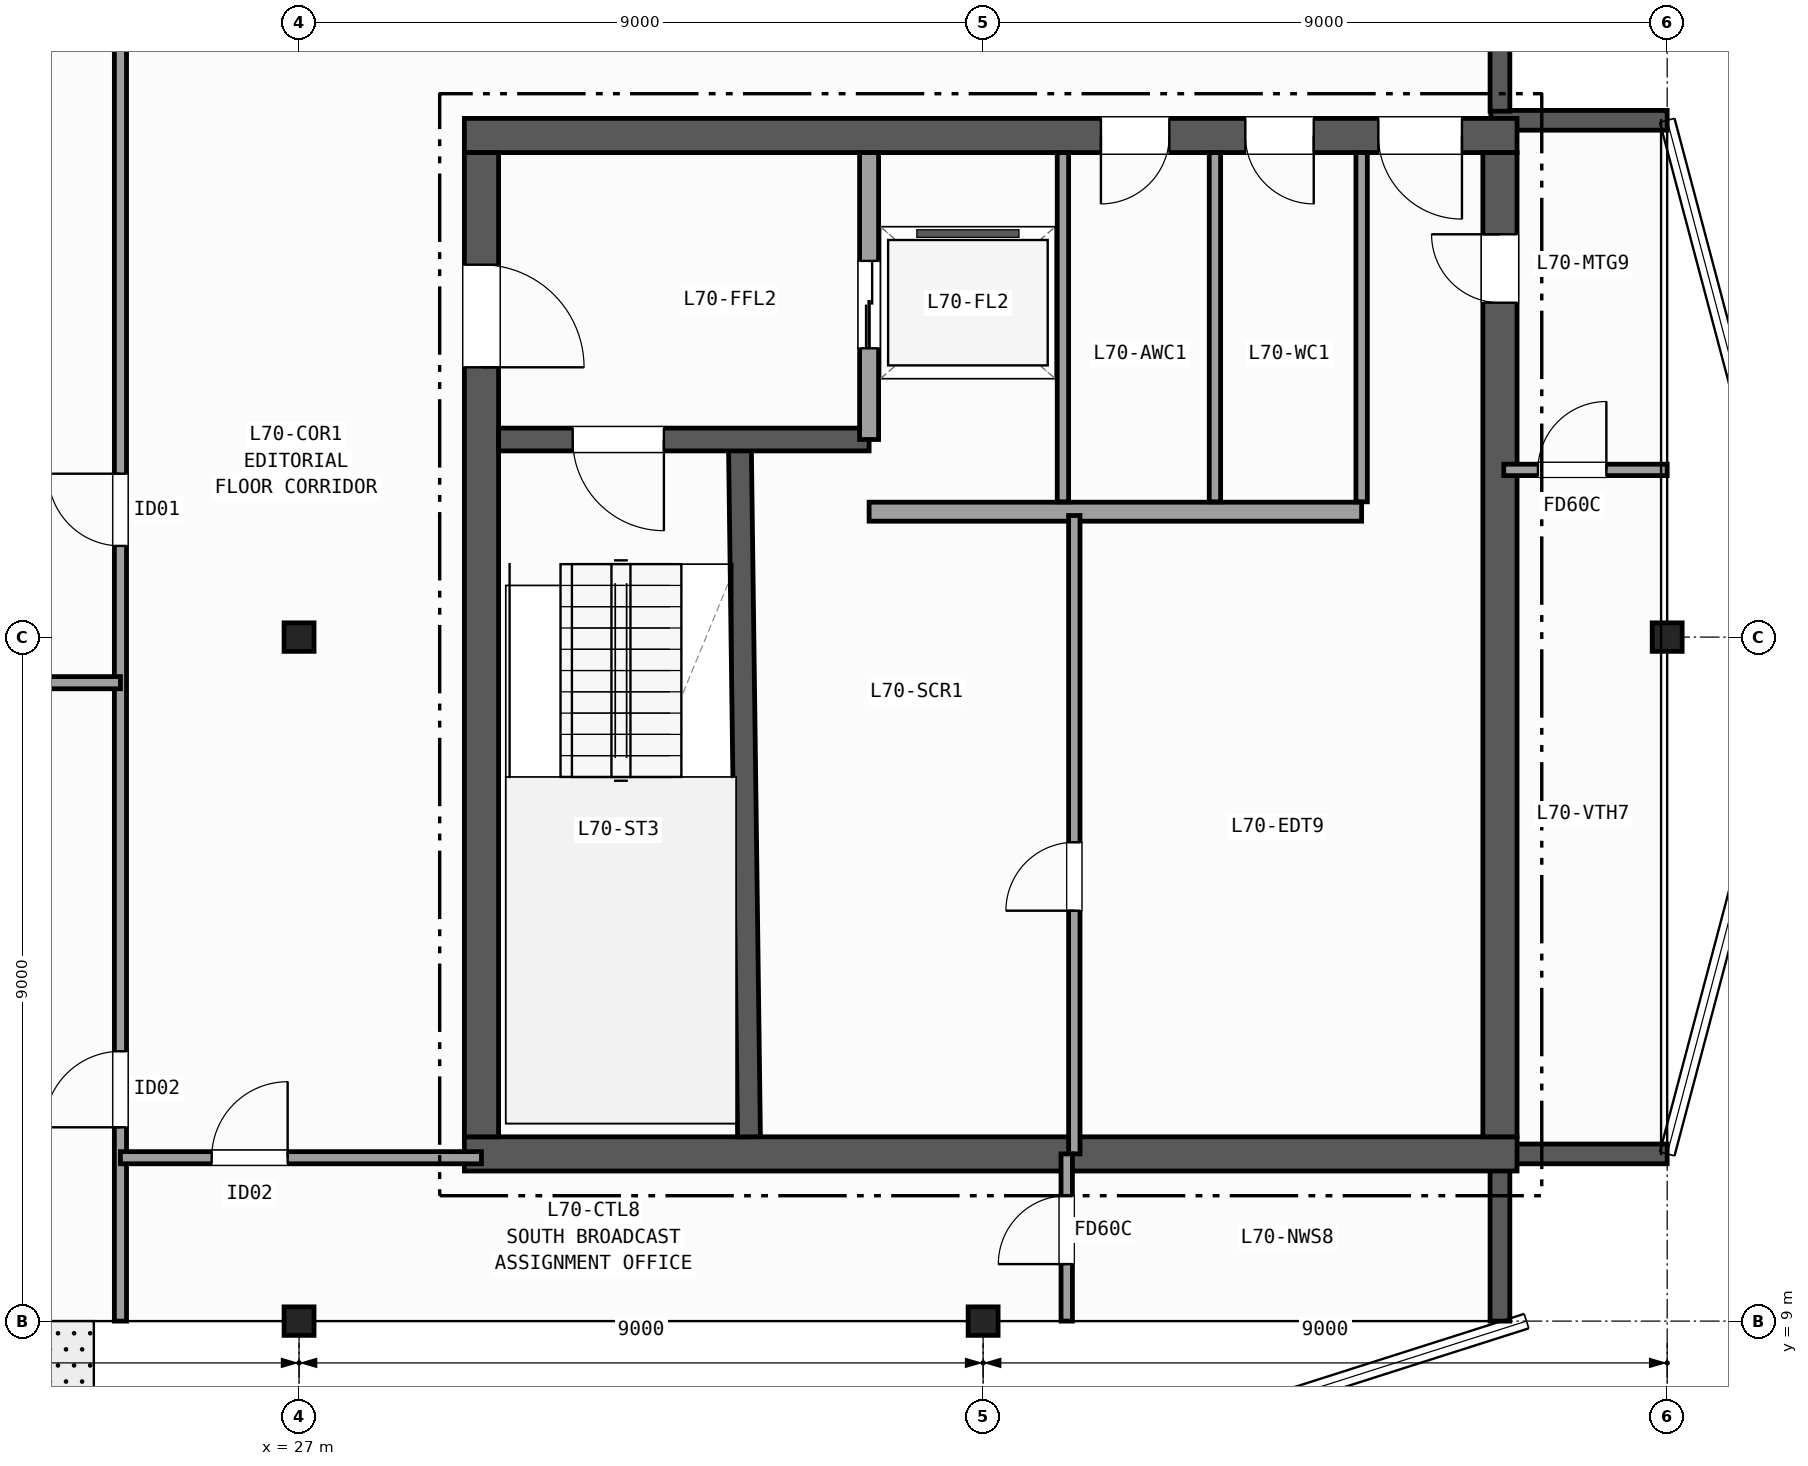
"""IFC4 building model, lengths in metres.
Left out: names, types, materials, properties, quantities, classifications, styles, units other than length and angle.
Written with IfcOpenShell. Run it as: python <this file> out.ifc"""

import sys

from ifc_helpers import new_model, si_unit, direction, frame, frame_2d, origin, origin_2d, place, context, subcontext, project, spatial, rectangle, i_section, extrude, element, fill, save


model = new_model("IFC4")
c1 = context("Model", 3, precision=1e-05, world=origin(), true_north=direction((0.0, 1.0)))
c2 = subcontext(c1, "Body", "Model", "MODEL_VIEW")
j1 = project(units=[si_unit("LENGTHUNIT", "METRE"), si_unit("PLANEANGLEUNIT", "RADIAN")], contexts=[c1])
p1 = place(None, origin())
s1 = spatial("IfcSite", under=j1, at=p1, CompositionType="ELEMENT")
p2 = place(p1, origin())
s2 = spatial("IfcBuilding", under=s1, at=p2, CompositionType="ELEMENT")
p3 = place(p2, frame((0.0, 0.0, 277.8)))
s3 = spatial("IfcBuildingStorey", under=s2, at=p3, CompositionType="ELEMENT", Elevation=277.8)
for number, where, z_axis, x_axis in (
    (1, (27.0, 9.0, 0.0), (0.0, 0.0, 1.0), (1.0, 0.0, 0.0)),
    (2, (27.0, 18.0, 0.0), (0.0, 0.0, 1.0), (1.0, 0.0, 0.0)),
    (3, (36.0, 9.0, 0.0), (0.0, 0.0, 1.0), (1.0, 0.0, 0.0)),
    (4, (45.0, 18.0, 0.0), (0.0, 0.0, 1.0), (1.0, 0.0, 0.0)),
):
    element("IfcColumn", number, at=place(p3, frame(where, z_axis=z_axis, x_axis=x_axis)), inside=s3, PredefinedType="COLUMN", context=c2, shape_type="SweptSolid", body=[
        extrude(i_section(OverallWidth=0.394, OverallDepth=0.375, WebThickness=0.017, FlangeThickness=0.028, FilletRadius=0.015, at=origin_2d()), origin(), (0.0, 0.0, 1.0), 3.7),
    ])
p4 = place(p3, frame((42.8, 9.0, 0.0), z_axis=(0.0, 0.0, 1.0), x_axis=(0.0, 1.0, 0.0)))
e5 = element("IfcWall", 5, at=p4, inside=s3, PredefinedType="SOLIDWALL", context=c2, shape_type="SweptSolid", body=[
    extrude(rectangle(XDim=2.08, YDim=0.26, at=frame_2d((1.04, 0.0))), origin(), (0.0, 0.0, 1.0), 3.42),
])
for number, where, z_axis, x_axis in (
    (6, (42.68, 11.2, 0.0), (0.0, 0.0, 1.0), (1.0, 0.0, 0.0)),
    (7, (45.0, 24.8, 0.0), (0.0, 0.0, 1.0), (-1.0, 0.0, 0.0)),
):
    element("IfcWall", number, at=place(p3, frame(where, z_axis=z_axis, x_axis=x_axis)), inside=s3, PredefinedType="SOLIDWALL", context=c2, shape_type="SweptSolid", body=[
        extrude(rectangle(XDim=2.32, YDim=0.26, at=frame_2d((1.16, 0.0))), origin(), (0.0, 0.0, 1.0), 3.42),
    ])
p5 = place(p3, frame((42.8, 24.92, 0.0), z_axis=(0.0, 0.0, 1.0), x_axis=(0.0, 1.0, 0.0)))
e8 = element("IfcWall", 8, at=p5, inside=s3, PredefinedType="SOLIDWALL", context=c2, shape_type="SweptSolid", body=[
    extrude(rectangle(XDim=2.08, YDim=0.26, at=frame_2d((1.04, 0.0))), origin(), (0.0, 0.0, 1.0), 3.42),
])
p6 = place(p3, frame((29.175, 11.2, 0.0), z_axis=(0.0, 0.0, 1.0), x_axis=(1.0, 0.0, 0.0)))
e9 = element("IfcWall", 9, at=p6, inside=s3, PredefinedType="SHEAR", context=c2, shape_type="SweptSolid", body=[
    extrude(rectangle(XDim=13.85, YDim=0.45, at=frame_2d((6.925, 0.0))), origin(), (0.0, 0.0, 1.0), 3.42),
])
p7 = place(p3, frame((43.025, 24.6, 0.0), z_axis=(0.0, 0.0, 1.0), x_axis=(-1.0, 0.0, 0.0)))
e10 = element("IfcWall", 10, at=p7, inside=s3, PredefinedType="SHEAR", context=c2, shape_type="SweptSolid", body=[
    extrude(rectangle(XDim=13.85, YDim=0.45, at=frame_2d((6.925, 0.0))), origin(), (0.0, 0.0, 1.0), 3.42),
])
p8 = place(p7, frame((0.725, 0.0, 0.0)))
e11 = element("IfcOpeningElement", 11, at=p8, cuts=e10, PredefinedType="OPENING", context=c2, shape_type="SweptSolid", body=[
    extrude(rectangle(XDim=1.1, YDim=2.15, at=frame_2d((0.55, 1.075))), frame((0.0, 0.235, 0.0), z_axis=(0.0, -1.0, 0.0), x_axis=(1.0, 0.0, 0.0)), (0.0, 0.0, 1.0), 0.47),
])
p9 = place(p7, frame((2.675, 0.0, 0.0)))
e12 = element("IfcOpeningElement", 12, at=p9, cuts=e10, PredefinedType="OPENING", context=c2, shape_type="SweptSolid", body=[
    extrude(rectangle(XDim=0.9, YDim=2.1, at=frame_2d((0.45, 1.05))), frame((0.0, 0.235, 0.0), z_axis=(0.0, -1.0, 0.0), x_axis=(1.0, 0.0, 0.0)), (0.0, 0.0, 1.0), 0.47),
])
p10 = place(p7, frame((4.575, 0.0, 0.0)))
e13 = element("IfcOpeningElement", 13, at=p10, cuts=e10, PredefinedType="OPENING", context=c2, shape_type="SweptSolid", body=[
    extrude(rectangle(XDim=0.9, YDim=2.1, at=frame_2d((0.45, 1.05))), frame((0.0, 0.235, 0.0), z_axis=(0.0, -1.0, 0.0), x_axis=(1.0, 0.0, 0.0)), (0.0, 0.0, 1.0), 0.47),
])
p11 = place(p3, frame((29.4, 24.375, 0.0), z_axis=(0.0, 0.0, 1.0), x_axis=(0.0, -1.0, 0.0)))
e14 = element("IfcWall", 14, at=p11, inside=s3, PredefinedType="SHEAR", context=c2, shape_type="SweptSolid", body=[
    extrude(rectangle(XDim=12.95, YDim=0.45, at=frame_2d((6.475, 0.0))), origin(), (0.0, 0.0, 1.0), 3.42),
])
p12 = place(p11, frame((1.475, 0.0, 0.0)))
e15 = element("IfcOpeningElement", 15, at=p12, cuts=e14, PredefinedType="OPENING", context=c2, shape_type="SweptSolid", body=[
    extrude(rectangle(XDim=1.35, YDim=2.15, at=frame_2d((0.675, 1.075))), frame((0.0, 0.235, 0.0), z_axis=(0.0, -1.0, 0.0), x_axis=(1.0, 0.0, 0.0)), (0.0, 0.0, 1.0), 0.47),
])
p13 = place(p3, frame((42.8, 11.425, 0.0), z_axis=(0.0, 0.0, 1.0), x_axis=(0.0, 1.0, 0.0)))
e16 = element("IfcWall", 16, at=p13, inside=s3, PredefinedType="SHEAR", context=c2, shape_type="SweptSolid", body=[
    extrude(rectangle(XDim=12.95, YDim=0.45, at=frame_2d((6.475, 0.0))), origin(), (0.0, 0.0, 1.0), 3.42),
])
p14 = place(p13, frame((10.975, 0.0, 0.0)))
e17 = element("IfcOpeningElement", 17, at=p14, cuts=e16, PredefinedType="OPENING", context=c2, shape_type="SweptSolid", body=[
    extrude(rectangle(XDim=0.9, YDim=2.1, at=frame_2d((0.45, 1.05))), frame((0.0, 0.235, 0.0), z_axis=(0.0, -1.0, 0.0), x_axis=(1.0, 0.0, 0.0)), (0.0, 0.0, 1.0), 0.47),
])
p15 = place(p3, frame((32.92, 11.425, 0.0), z_axis=(0.0, 0.0, 1.0), x_axis=(-0.013135638869, 0.999913723774, 0.0)))
e18 = element("IfcWall", 18, at=p15, inside=s3, PredefinedType="SHEAR", context=c2, shape_type="SweptSolid", body=[
    extrude(rectangle(XDim=9.126, YDim=0.3, at=frame_2d((4.563, 0.0))), origin(), (0.0, 0.0, 1.0), 3.42),
])
p16 = place(p3, frame((34.5, 20.6, 0.0), z_axis=(0.0, 0.0, 1.0), x_axis=(-1.0, 0.0, 0.0)))
e19 = element("IfcWall", 19, at=p16, inside=s3, PredefinedType="SHEAR", context=c2, shape_type="SweptSolid", body=[
    extrude(rectangle(XDim=4.875, YDim=0.3, at=frame_2d((2.438, 0.0))), origin(), (0.0, 0.0, 1.0), 3.42),
])
p17 = place(p16, frame((2.7, 0.0, 0.0)))
e20 = element("IfcOpeningElement", 20, at=p17, cuts=e19, PredefinedType="OPENING", context=c2, shape_type="SweptSolid", body=[
    extrude(rectangle(XDim=1.2, YDim=2.15, at=frame_2d((0.6, 1.075))), frame((0.0, 0.16, 0.0), z_axis=(0.0, -1.0, 0.0), x_axis=(1.0, 0.0, 0.0)), (0.0, 0.0, 1.0), 0.32),
])
p18 = place(p3, frame((34.5, 20.6, 0.0), z_axis=(0.0, 0.0, 1.0), x_axis=(0.0, 1.0, 0.0)))
e21 = element("IfcWall", 21, at=p18, inside=s3, PredefinedType="PARTITIONING", context=c2, shape_type="SweptSolid", body=[
    extrude(rectangle(XDim=3.775, YDim=0.25, at=frame_2d((1.887, 0.0))), origin(), (0.0, 0.0, 1.0), 3.42),
])
p19 = place(p18, frame((1.2, 0.0, 0.0)))
e22 = element("IfcOpeningElement", 22, at=p19, cuts=e21, PredefinedType="OPENING", context=c2, shape_type="SweptSolid", body=[
    extrude(rectangle(XDim=1.15, YDim=2.15, at=frame_2d((0.575, 1.075))), frame((0.0, 0.135, 0.0), z_axis=(0.0, -1.0, 0.0), x_axis=(1.0, 0.0, 0.0)), (0.0, 0.0, 1.0), 0.27),
])
p20 = place(p3, frame((34.5, 19.65, 0.0), z_axis=(0.0, 0.0, 1.0), x_axis=(1.0, 0.0, 0.0)))
e23 = element("IfcWall", 23, at=p20, inside=s3, PredefinedType="PARTITIONING", context=c2, shape_type="SweptSolid", body=[
    extrude(rectangle(XDim=6.48, YDim=0.25, at=frame_2d((3.24, 0.0))), origin(), (0.0, 0.0, 1.0), 3.42),
])
p21 = place(p3, frame((37.2, 11.2, 0.0), z_axis=(0.0, 0.0, 1.0), x_axis=(0.0, 1.0, 0.0)))
e24 = element("IfcWall", 24, at=p21, inside=s3, PredefinedType="PARTITIONING", context=c2, shape_type="SweptSolid", body=[
    extrude(rectangle(XDim=8.4, YDim=0.15, at=frame_2d((4.2, 0.0))), origin(), (0.0, 0.0, 1.0), 3.42),
])
p22 = place(p21, frame((3.2, 0.0, 0.0)))
e25 = element("IfcOpeningElement", 25, at=p22, cuts=e24, PredefinedType="OPENING", context=c2, shape_type="SweptSolid", body=[
    extrude(rectangle(XDim=0.9, YDim=2.1, at=frame_2d((0.45, 1.05))), frame((0.0, 0.085, 0.0), z_axis=(0.0, -1.0, 0.0), x_axis=(1.0, 0.0, 0.0)), (0.0, 0.0, 1.0), 0.17),
])
for number, where, z_axis, x_axis in (
    (26, (37.05, 19.78, 0.0), (0.0, 0.0, 1.0), (0.0, 1.0, 0.0)),
    (27, (39.05, 19.78, 0.0), (0.0, 0.0, 1.0), (0.0, 1.0, 0.0)),
    (28, (40.98, 19.78, 0.0), (0.0, 0.0, 1.0), (0.0, 1.0, 0.0)),
):
    element("IfcWall", number, at=place(p3, frame(where, z_axis=z_axis, x_axis=x_axis)), inside=s3, PredefinedType="PARTITIONING", context=c2, shape_type="SweptSolid", body=[
        extrude(rectangle(XDim=4.595, YDim=0.15, at=frame_2d((2.297, 0.0))), origin(), (0.0, 0.0, 1.0), 3.42),
    ])
p23 = place(p3, frame((24.65, 9.0, 0.0), z_axis=(0.0, 0.0, 1.0), x_axis=(0.0, 1.0, 0.0)))
e29 = element("IfcWall", 29, at=p23, inside=s3, PredefinedType="PARTITIONING", context=c2, shape_type="SweptSolid", body=[
    extrude(rectangle(XDim=19.2, YDim=0.16, at=frame_2d((9.6, 0.0))), origin(), (0.0, 0.0, 1.0), 2.707),
])
p24 = place(p23, frame((10.2, 0.0, 0.0)))
e30 = element("IfcOpeningElement", 30, at=p24, cuts=e29, PredefinedType="OPENING", context=c2, shape_type="SweptSolid", body=[
    extrude(rectangle(XDim=0.95, YDim=2.1, at=frame_2d((0.475, 1.05))), frame((0.0, 0.09, 0.0), z_axis=(0.0, -1.0, 0.0), x_axis=(1.0, 0.0, 0.0)), (0.0, 0.0, 1.0), 0.18),
])
p25 = place(p23, frame((2.55, 0.0, 0.0)))
e31 = element("IfcOpeningElement", 31, at=p25, cuts=e29, PredefinedType="OPENING", context=c2, shape_type="SweptSolid", body=[
    extrude(rectangle(XDim=1.0, YDim=2.1, at=frame_2d((0.5, 1.05))), frame((0.0, 0.09, 0.0), z_axis=(0.0, -1.0, 0.0), x_axis=(1.0, 0.0, 0.0)), (0.0, 0.0, 1.0), 0.18),
])
p26 = place(p3, frame((18.0, 17.4, 0.0), z_axis=(0.0, 0.0, 1.0), x_axis=(1.0, 0.0, 0.0)))
e32 = element("IfcWall", 32, at=p26, inside=s3, PredefinedType="PARTITIONING", context=c2, shape_type="SweptSolid", body=[
    extrude(rectangle(XDim=6.65, YDim=0.16, at=frame_2d((3.325, 0.0))), origin(), (0.0, 0.0, 1.0), 2.792),
])
p27 = place(p3, frame((24.65, 11.15, 0.0), z_axis=(0.0, 0.0, 1.0), x_axis=(1.0, 0.0, 0.0)))
e33 = element("IfcWall", 33, at=p27, inside=s3, PredefinedType="PARTITIONING", context=c2, shape_type="SweptSolid", body=[
    extrude(rectangle(XDim=4.75, YDim=0.16, at=frame_2d((2.375, 0.0))), origin(), (0.0, 0.0, 1.0), 2.792),
])
p28 = place(p27, frame((1.2, 0.0, 0.0)))
e34 = element("IfcOpeningElement", 34, at=p28, cuts=e33, PredefinedType="OPENING", context=c2, shape_type="SweptSolid", body=[
    extrude(rectangle(XDim=1.0, YDim=2.1, at=frame_2d((0.5, 1.05))), frame((0.0, 0.09, 0.0), z_axis=(0.0, -1.0, 0.0), x_axis=(1.0, 0.0, 0.0)), (0.0, 0.0, 1.0), 0.18),
])
p29 = place(p3, frame((37.1, 9.0, 0.0), z_axis=(0.0, 0.0, 1.0), x_axis=(0.0, 1.0, 0.0)))
e35 = element("IfcWall", 35, at=p29, inside=s3, PredefinedType="PARTITIONING", context=c2, shape_type="SweptSolid", body=[
    extrude(rectangle(XDim=2.2, YDim=0.15, at=frame_2d((1.1, 0.0))), origin(), (0.0, 0.0, 1.0), 3.42),
])
p30 = place(p29, frame((0.75, 0.0, 0.0)))
e36 = element("IfcOpeningElement", 36, at=p30, cuts=e35, PredefinedType="OPENING", context=c2, shape_type="SweptSolid", body=[
    extrude(rectangle(XDim=0.9, YDim=2.1, at=frame_2d((0.45, 1.05))), frame((0.0, 0.085, 0.0), z_axis=(0.0, -1.0, 0.0), x_axis=(1.0, 0.0, 0.0)), (0.0, 0.0, 1.0), 0.17),
])
p31 = place(p3, frame((42.85, 20.2, 0.0), z_axis=(0.0, 0.0, 1.0), x_axis=(1.0, 0.0, 0.0)))
e37 = element("IfcWall", 37, at=p31, inside=s3, PredefinedType="PARTITIONING", context=c2, shape_type="SweptSolid", body=[
    extrude(rectangle(XDim=2.15, YDim=0.15, at=frame_2d((1.075, 0.0))), origin(), (0.0, 0.0, 1.0), 3.42),
])
p32 = place(p31, frame((0.45, 0.0, 0.0)))
e38 = element("IfcOpeningElement", 38, at=p32, cuts=e37, PredefinedType="OPENING", context=c2, shape_type="SweptSolid", body=[
    extrude(rectangle(XDim=0.9, YDim=2.1, at=frame_2d((0.45, 1.05))), frame((0.0, 0.085, 0.0), z_axis=(0.0, -1.0, 0.0), x_axis=(1.0, 0.0, 0.0)), (0.0, 0.0, 1.0), 0.17),
])
p33 = place(p17, origin())
e39 = element("IfcDoor", 39, at=p33, inside=s3, OperationType="SINGLE_SWING_LEFT", PredefinedType="DOOR", context=c2, shape_type="SweptSolid", body=[
    extrude(rectangle(XDim=1.2, YDim=2.15, at=frame_2d((0.6, 1.075))), frame((0.0, 0.025, 0.0), z_axis=(0.0, -1.0, 0.0), x_axis=(1.0, 0.0, 0.0)), (0.0, 0.0, 1.0), 0.05),
])
fill(e20, e39)
p34 = place(p12, origin())
e40 = element("IfcDoor", 40, at=p34, inside=s3, OperationType="SINGLE_SWING_RIGHT", PredefinedType="DOOR", context=c2, shape_type="SweptSolid", body=[
    extrude(rectangle(XDim=1.35, YDim=2.15, at=frame_2d((0.675, 1.075))), frame((0.0, 0.025, 0.0), z_axis=(0.0, -1.0, 0.0), x_axis=(1.0, 0.0, 0.0)), (0.0, 0.0, 1.0), 0.05),
])
fill(e15, e40)
p35 = place(p14, origin())
e41 = element("IfcDoor", 41, at=p35, inside=s3, OperationType="SINGLE_SWING_RIGHT", PredefinedType="DOOR", context=c2, shape_type="SweptSolid", body=[
    extrude(rectangle(XDim=0.9, YDim=2.1, at=frame_2d((0.45, 1.05))), frame((0.0, 0.025, 0.0), z_axis=(0.0, -1.0, 0.0), x_axis=(1.0, 0.0, 0.0)), (0.0, 0.0, 1.0), 0.05),
])
fill(e17, e41)
p36 = place(p8, origin())
e42 = element("IfcDoor", 42, at=p36, inside=s3, OperationType="SINGLE_SWING_LEFT", PredefinedType="DOOR", context=c2, shape_type="SweptSolid", body=[
    extrude(rectangle(XDim=1.1, YDim=2.15, at=frame_2d((0.55, 1.075))), frame((0.0, 0.025, 0.0), z_axis=(0.0, -1.0, 0.0), x_axis=(1.0, 0.0, 0.0)), (0.0, 0.0, 1.0), 0.05),
])
fill(e11, e42)
p37 = place(p9, origin())
e43 = element("IfcDoor", 43, at=p37, inside=s3, OperationType="SINGLE_SWING_LEFT", PredefinedType="DOOR", context=c2, shape_type="SweptSolid", body=[
    extrude(rectangle(XDim=0.9, YDim=2.1, at=frame_2d((0.45, 1.05))), frame((0.0, 0.025, 0.0), z_axis=(0.0, -1.0, 0.0), x_axis=(1.0, 0.0, 0.0)), (0.0, 0.0, 1.0), 0.05),
])
fill(e12, e43)
p38 = place(p10, origin())
e44 = element("IfcDoor", 44, at=p38, inside=s3, OperationType="SINGLE_SWING_RIGHT", PredefinedType="DOOR", context=c2, shape_type="SweptSolid", body=[
    extrude(rectangle(XDim=0.9, YDim=2.1, at=frame_2d((0.45, 1.05))), frame((0.0, 0.025, 0.0), z_axis=(0.0, -1.0, 0.0), x_axis=(1.0, 0.0, 0.0)), (0.0, 0.0, 1.0), 0.05),
])
fill(e13, e44)
p39 = place(p19, origin())
e45 = element("IfcDoor", 45, at=p39, inside=s3, OperationType="DOUBLE_DOOR_SLIDING", PredefinedType="DOOR", context=c2, shape_type="SweptSolid", body=[
    extrude(rectangle(XDim=1.15, YDim=2.15, at=frame_2d((0.575, 1.075))), frame((0.0, 0.025, 0.0), z_axis=(0.0, -1.0, 0.0), x_axis=(1.0, 0.0, 0.0)), (0.0, 0.0, 1.0), 0.05),
])
fill(e22, e45)
p40 = place(p22, origin())
e46 = element("IfcDoor", 46, at=p40, inside=s3, OperationType="SINGLE_SWING_LEFT", PredefinedType="DOOR", context=c2, shape_type="SweptSolid", body=[
    extrude(rectangle(XDim=0.9, YDim=2.1, at=frame_2d((0.45, 1.05))), frame((0.0, 0.025, 0.0), z_axis=(0.0, -1.0, 0.0), x_axis=(1.0, 0.0, 0.0)), (0.0, 0.0, 1.0), 0.05),
])
fill(e25, e46)
p41 = place(p24, origin())
e47 = element("IfcDoor", 47, at=p41, inside=s3, OperationType="SINGLE_SWING_RIGHT", PredefinedType="DOOR", context=c2, shape_type="SweptSolid", body=[
    extrude(rectangle(XDim=0.95, YDim=2.1, at=frame_2d((0.475, 1.05))), frame((0.0, 0.025, 0.0), z_axis=(0.0, -1.0, 0.0), x_axis=(1.0, 0.0, 0.0)), (0.0, 0.0, 1.0), 0.05),
])
fill(e30, e47)
p42 = place(p25, origin())
e48 = element("IfcDoor", 48, at=p42, inside=s3, OperationType="SINGLE_SWING_LEFT", PredefinedType="DOOR", context=c2, shape_type="SweptSolid", body=[
    extrude(rectangle(XDim=1.0, YDim=2.1, at=frame_2d((0.5, 1.05))), frame((0.0, 0.025, 0.0), z_axis=(0.0, -1.0, 0.0), x_axis=(1.0, 0.0, 0.0)), (0.0, 0.0, 1.0), 0.05),
])
fill(e31, e48)
p43 = place(p28, origin())
e49 = element("IfcDoor", 49, at=p43, inside=s3, OperationType="SINGLE_SWING_RIGHT", PredefinedType="DOOR", context=c2, shape_type="SweptSolid", body=[
    extrude(rectangle(XDim=1.0, YDim=2.1, at=frame_2d((0.5, 1.05))), frame((0.0, 0.025, 0.0), z_axis=(0.0, -1.0, 0.0), x_axis=(1.0, 0.0, 0.0)), (0.0, 0.0, 1.0), 0.05),
])
fill(e34, e49)
p44 = place(p30, origin())
e50 = element("IfcDoor", 50, at=p44, inside=s3, OperationType="SINGLE_SWING_LEFT", PredefinedType="DOOR", context=c2, shape_type="SweptSolid", body=[
    extrude(rectangle(XDim=0.9, YDim=2.1, at=frame_2d((0.45, 1.05))), frame((0.0, 0.025, 0.0), z_axis=(0.0, -1.0, 0.0), x_axis=(1.0, 0.0, 0.0)), (0.0, 0.0, 1.0), 0.05),
])
fill(e36, e50)
p45 = place(p32, origin())
e51 = element("IfcDoor", 51, at=p45, inside=s3, OperationType="SINGLE_SWING_RIGHT", PredefinedType="DOOR", context=c2, shape_type="SweptSolid", body=[
    extrude(rectangle(XDim=0.9, YDim=2.1, at=frame_2d((0.45, 1.05))), frame((0.0, 0.025, 0.0), z_axis=(0.0, -1.0, 0.0), x_axis=(1.0, 0.0, 0.0)), (0.0, 0.0, 1.0), 0.05),
])
fill(e38, e51)
save(model, sys.argv[1])
